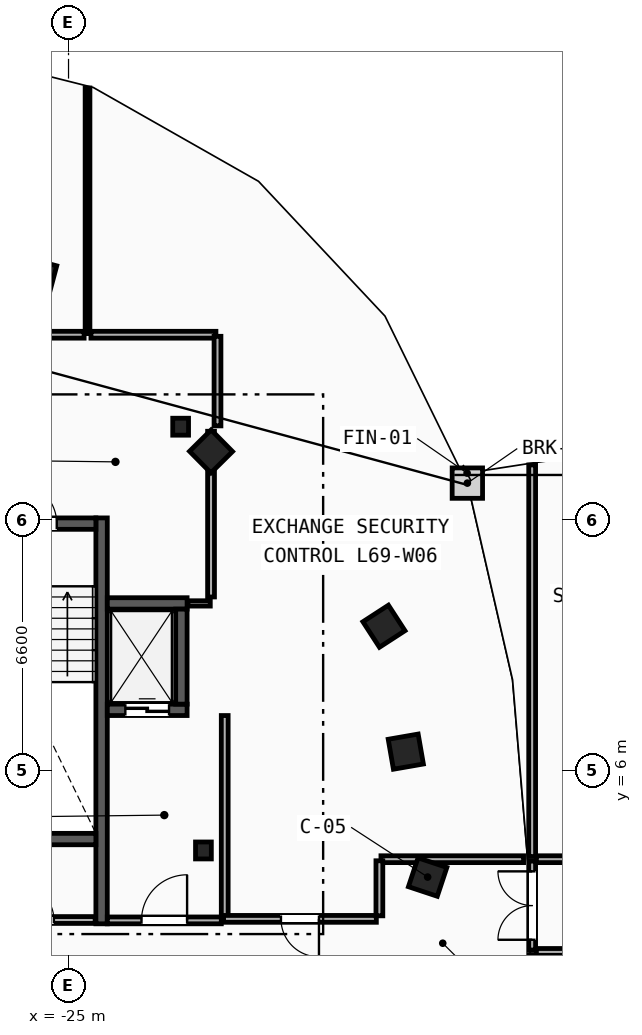
"""IFC4 building model, lengths in metres.
Left out: names, types, materials, properties, quantities, classifications, styles, units other than length and angle.
Written with IfcOpenShell. Run it as: python <this file> out.ifc"""

import sys

from ifc_helpers import new_model, si_unit, direction, frame, frame_2d, origin, origin_2d, place, context, subcontext, project, spatial, rectangle, i_section, extrude, element, fill, save


model = new_model("IFC4")
c1 = context("Model", 3, precision=1e-05, world=origin(), true_north=direction((0.0, 1.0)))
c2 = subcontext(c1, "Body", "Model", "MODEL_VIEW")
j1 = project(units=[si_unit("LENGTHUNIT", "METRE"), si_unit("PLANEANGLEUNIT", "RADIAN")], contexts=[c1])
p1 = place(None, origin())
s1 = spatial("IfcSite", under=j1, at=p1, CompositionType="ELEMENT")
p2 = place(p1, origin())
s2 = spatial("IfcBuilding", under=s1, at=p2, CompositionType="ELEMENT")
p3 = place(p2, frame((0.0, 0.0, 261.2)))
s3 = spatial("IfcBuildingStorey", under=s2, at=p3, CompositionType="ELEMENT", Elevation=261.2)
for number, where, z_axis, x_axis in (
    (1, (-21.45, 3.9, 0.0), (0.0, 0.0, 1.0), (1.0, 0.0, 0.0)),
    (2, (-22.05, 15.05, 0.0), (0.0, 0.0, 1.0), (1.0, 0.0, 0.0)),
):
    element("IfcColumn", number, at=place(p3, frame(where, z_axis=z_axis, x_axis=x_axis)), inside=s3, PredefinedType="COLUMN", context=c2, shape_type="SweptSolid", body=[
        extrude(i_section(OverallWidth=0.416, OverallDepth=0.446, WebThickness=0.039, FlangeThickness=0.063, FilletRadius=0.018, at=origin_2d()), origin(), (0.0, 0.0, 1.0), 3.6),
    ])
for number, where, z_axis, x_axis in (
    (3, (-15.55, 3.2, 0.0), (0.0, 0.0, 1.0), (0.315, 0.949, 0.0)),
    (4, (-16.125, 6.5, 0.0), (0.0, 0.0, 1.0), (-0.172, 0.985, 0.0)),
    (5, (-16.7, 9.8, 0.0), (0.0, 0.0, 1.0), (-0.544, 0.839, 0.0)),
    (6, (-21.25, 14.4, 0.0), (0.0, 0.0, 1.0), (-0.703, 0.711, 0.0)),
    (7, (-25.8, 19.0, 0.0), (0.0, 0.0, 1.0), (-0.966, 0.259, 0.0)),
):
    element("IfcColumn", number, at=place(p3, frame(where, z_axis=z_axis, x_axis=x_axis)), inside=s3, PredefinedType="COLUMN", context=c2, shape_type="SweptSolid", body=[
        extrude(rectangle(XDim=0.8, YDim=0.8, at=origin_2d()), origin(), (0.0, 0.0, 1.0), 3.6),
    ])
p4 = place(p3, frame((-24.13, 1.97, 0.0), z_axis=(0.0, 0.0, 1.0), x_axis=(0.0, 1.0, 0.0)))
e8 = element("IfcWall", 8, at=p4, inside=s3, PredefinedType="SHEAR", context=c2, shape_type="SweptSolid", body=[
    extrude(rectangle(XDim=10.68, YDim=0.3, at=frame_2d((5.34, 0.0))), origin(), (0.0, 0.0, 1.0), 3.34),
])
p5 = place(p3, frame((-27.44, 12.5, 0.0), z_axis=(0.0, 0.0, 1.0), x_axis=(1.0, 0.0, 0.0)))
e9 = element("IfcWall", 9, at=p5, inside=s3, PredefinedType="SHEAR", context=c2, shape_type="SweptSolid", body=[
    extrude(rectangle(XDim=3.16, YDim=0.3, at=frame_2d((1.58, 0.0))), origin(), (0.0, 0.0, 1.0), 3.34),
])
p6 = place(p5, frame((1.03, 0.0, 0.0)))
e10 = element("IfcOpeningElement", 10, at=p6, cuts=e9, PredefinedType="OPENING", context=c2, shape_type="SweptSolid", body=[
    extrude(rectangle(XDim=1.1, YDim=2.15, at=frame_2d((0.55, 1.075))), frame((0.0, 0.16, 0.0), z_axis=(0.0, -1.0, 0.0), x_axis=(1.0, 0.0, 0.0)), (0.0, 0.0, 1.0), 0.32),
])
p7 = place(p3, frame((-27.44, 4.2, 0.0), z_axis=(0.0, 0.0, 1.0), x_axis=(1.0, 0.0, 0.0)))
e11 = element("IfcWall", 11, at=p7, inside=s3, PredefinedType="SHEAR", context=c2, shape_type="SweptSolid", body=[
    extrude(rectangle(XDim=3.16, YDim=0.3, at=frame_2d((1.58, 0.0))), origin(), (0.0, 0.0, 1.0), 3.34),
])
p8 = place(p3, frame((-20.89, 2.15, 0.0), z_axis=(0.0, 0.0, 1.0), x_axis=(0.0, 1.0, 0.0)))
e12 = element("IfcWall", 12, at=p8, inside=s3, PredefinedType="PARTITIONING", context=c2, shape_type="SweptSolid", body=[
    extrude(rectangle(XDim=5.3, YDim=0.18, at=frame_2d((2.65, 0.0))), origin(), (0.0, 0.0, 1.0), 3.34),
])
p9 = place(p3, frame((-23.98, 2.06, 0.0), z_axis=(0.0, 0.0, 1.0), x_axis=(1.0, 0.0, 0.0)))
e13 = element("IfcWall", 13, at=p9, inside=s3, PredefinedType="PARTITIONING", context=c2, shape_type="SweptSolid", body=[
    extrude(rectangle(XDim=3.0, YDim=0.18, at=frame_2d((1.5, 0.0))), origin(), (0.0, 0.0, 1.0), 3.34),
])
p10 = place(p9, frame((0.9, 0.0, 0.0)))
e14 = element("IfcOpeningElement", 14, at=p10, cuts=e13, PredefinedType="OPENING", context=c2, shape_type="SweptSolid", body=[
    extrude(rectangle(XDim=1.2, YDim=2.15, at=frame_2d((0.6, 1.075))), frame((0.0, 0.1, 0.0), z_axis=(0.0, -1.0, 0.0), x_axis=(1.0, 0.0, 0.0)), (0.0, 0.0, 1.0), 0.2),
])
p11 = place(p3, frame((-23.98, 7.6, 0.0), z_axis=(0.0, 0.0, 1.0), x_axis=(1.0, 0.0, 0.0)))
e15 = element("IfcWall", 15, at=p11, inside=s3, PredefinedType="SHEAR", context=c2, shape_type="SweptSolid", body=[
    extrude(rectangle(XDim=2.1, YDim=0.3, at=frame_2d((1.05, 0.0))), origin(), (0.0, 0.0, 1.0), 3.34),
])
p12 = place(p11, frame((0.475, 0.0, 0.0)))
e16 = element("IfcOpeningElement", 16, at=p12, cuts=e15, PredefinedType="OPENING", context=c2, shape_type="SweptSolid", body=[
    extrude(rectangle(XDim=1.15, YDim=2.2, at=frame_2d((0.575, 1.1))), frame((0.0, 0.16, 0.0), z_axis=(0.0, -1.0, 0.0), x_axis=(1.0, 0.0, 0.0)), (0.0, 0.0, 1.0), 0.32),
])
p13 = place(p3, frame((-23.98, 10.4, 0.0), z_axis=(0.0, 0.0, 1.0), x_axis=(1.0, 0.0, 0.0)))
e17 = element("IfcWall", 17, at=p13, inside=s3, PredefinedType="SHEAR", context=c2, shape_type="SweptSolid", body=[
    extrude(rectangle(XDim=2.1, YDim=0.3, at=frame_2d((1.05, 0.0))), origin(), (0.0, 0.0, 1.0), 3.34),
])
p14 = place(p3, frame((-22.03, 7.75, 0.0), z_axis=(0.0, 0.0, 1.0), x_axis=(0.0, 1.0, 0.0)))
e18 = element("IfcWall", 18, at=p14, inside=s3, PredefinedType="SHEAR", context=c2, shape_type="SweptSolid", body=[
    extrude(rectangle(XDim=2.5, YDim=0.3, at=frame_2d((1.25, 0.0))), origin(), (0.0, 0.0, 1.0), 3.34),
])
p15 = place(p3, frame((-21.86, 10.4, 0.0), z_axis=(0.0, 0.0, 1.0), x_axis=(1.0, 0.0, 0.0)))
e19 = element("IfcWall", 19, at=p15, inside=s3, PredefinedType="PARTITIONING", context=c2, shape_type="SweptSolid", body=[
    extrude(rectangle(XDim=0.59, YDim=0.14, at=frame_2d((0.295, 0.0))), origin(), (0.0, 0.0, 1.0), 3.34),
])
p16 = place(p3, frame((-21.25, 10.57, 0.0), z_axis=(0.0, 0.0, 1.0), x_axis=(0.0, 1.0, 0.0)))
e20 = element("IfcWall", 20, at=p16, inside=s3, PredefinedType="PARTITIONING", context=c2, shape_type="SweptSolid", body=[
    extrude(rectangle(XDim=4.36, YDim=0.18, at=frame_2d((2.18, 0.0))), origin(), (0.0, 0.0, 1.0), 3.34),
])
p17 = place(p3, frame((-27.42, 2.07, 0.0), z_axis=(0.0, 0.0, 1.0), x_axis=(1.0, 0.0, 0.0)))
e21 = element("IfcWall", 21, at=p17, inside=s3, PredefinedType="PARTITIONING", context=c2, shape_type="SweptSolid", body=[
    extrude(rectangle(XDim=3.12, YDim=0.18, at=frame_2d((1.56, 0.0))), origin(), (0.0, 0.0, 1.0), 3.34),
])
p18 = place(p17, frame((1.085, 0.0, 0.0)))
e22 = element("IfcOpeningElement", 22, at=p18, cuts=e21, PredefinedType="OPENING", context=c2, shape_type="SweptSolid", body=[
    extrude(rectangle(XDim=0.95, YDim=2.1, at=frame_2d((0.475, 1.05))), frame((0.0, 0.1, 0.0), z_axis=(0.0, -1.0, 0.0), x_axis=(1.0, 0.0, 0.0)), (0.0, 0.0, 1.0), 0.2),
])
p19 = place(p3, frame((-24.5, 17.5, 0.0), z_axis=(0.0, 0.0, 1.0), x_axis=(0.0, 1.0, 0.0)))
e23 = element("IfcWall", 23, at=p19, inside=s3, PredefinedType="PARTITIONING", context=c2, shape_type="SweptSolid", body=[
    extrude(rectangle(XDim=6.463, YDim=0.125, at=frame_2d((3.231, 0.0))), origin(), (0.0, 0.0, 1.0), 3.34),
])
p20 = place(p3, frame((-16.9, 2.1, 0.0), z_axis=(0.0, 0.0, 1.0), x_axis=(-1.0, 0.0, 0.0)))
e24 = element("IfcWall", 24, at=p20, inside=s3, PredefinedType="PARTITIONING", context=c2, shape_type="SweptSolid", body=[
    extrude(rectangle(XDim=4.02, YDim=0.18, at=frame_2d((2.01, 0.0))), origin(), (0.0, 0.0, 1.0), 3.34),
])
p21 = place(p20, frame((1.51, 0.0, 0.0)))
e25 = element("IfcOpeningElement", 25, at=p21, cuts=e24, PredefinedType="OPENING", context=c2, shape_type="SweptSolid", body=[
    extrude(rectangle(XDim=1.0, YDim=2.15, at=frame_2d((0.5, 1.075))), frame((0.0, 0.1, 0.0), z_axis=(0.0, -1.0, 0.0), x_axis=(1.0, 0.0, 0.0)), (0.0, 0.0, 1.0), 0.2),
])
p22 = place(p3, frame((-13.026, 3.67, 0.0), z_axis=(0.0, 0.0, 1.0), x_axis=(-1.0, 0.0, 0.0)))
e26 = element("IfcWall", 26, at=p22, inside=s3, PredefinedType="PARTITIONING", context=c2, shape_type="SweptSolid", body=[
    extrude(rectangle(XDim=3.753, YDim=0.18, at=frame_2d((1.876, 0.0))), origin(), (0.0, 0.0, 1.0), 3.34),
])
p23 = place(p3, frame((-21.122, 17.47, 0.0), z_axis=(0.0, 0.0, 1.0), x_axis=(-1.0, 0.0, 0.0)))
e27 = element("IfcWall", 27, at=p23, inside=s3, PredefinedType="PARTITIONING", context=c2, shape_type="SweptSolid", body=[
    extrude(rectangle(XDim=3.288, YDim=0.18, at=frame_2d((1.644, 0.0))), origin(), (0.0, 0.0, 1.0), 3.34),
])
p24 = place(p3, frame((-21.08, 15.072, 0.0), z_axis=(0.0, 0.0, 1.0), x_axis=(0.0, 1.0, 0.0)))
e28 = element("IfcWall", 28, at=p24, inside=s3, PredefinedType="PARTITIONING", context=c2, shape_type="SweptSolid", body=[
    extrude(rectangle(XDim=2.357, YDim=0.18, at=frame_2d((1.178, 0.0))), origin(), (0.0, 0.0, 1.0), 3.34),
])
p25 = place(p3, frame((-16.82, 3.628, 0.0), z_axis=(0.0, 0.0, 1.0), x_axis=(0.0, -1.0, 0.0)))
e29 = element("IfcWall", 29, at=p25, inside=s3, PredefinedType="PARTITIONING", context=c2, shape_type="SweptSolid", body=[
    extrude(rectangle(XDim=1.448, YDim=0.18, at=frame_2d((0.724, 0.0))), origin(), (0.0, 0.0, 1.0), 3.34),
])
p26 = place(p3, frame((-24.59, 17.47, 0.0), z_axis=(0.0, 0.0, 1.0), x_axis=(-1.0, 0.0, 0.0)))
e30 = element("IfcWall", 30, at=p26, inside=s3, PredefinedType="PARTITIONING", context=c2, shape_type="SweptSolid", body=[
    extrude(rectangle(XDim=6.82, YDim=0.18, at=frame_2d((3.41, 0.0))), origin(), (0.0, 0.0, 1.0), 3.34),
])
p27 = place(p26, frame((2.91, 0.0, 0.0)))
e31 = element("IfcOpeningElement", 31, at=p27, cuts=e30, PredefinedType="OPENING", context=c2, shape_type="SweptSolid", body=[
    extrude(rectangle(XDim=1.0, YDim=2.15, at=frame_2d((0.5, 1.075))), frame((0.0, 0.1, 0.0), z_axis=(0.0, -1.0, 0.0), x_axis=(1.0, 0.0, 0.0)), (0.0, 0.0, 1.0), 0.2),
])
p28 = place(p3, frame((-12.688, 1.23, 0.0), z_axis=(0.0, 0.0, 1.0), x_axis=(1.0, 0.0, 0.0)))
e32 = element("IfcWall", 32, at=p28, inside=s3, PredefinedType="PARTITIONING", context=c2, shape_type="SweptSolid", body=[
    extrude(rectangle(XDim=10.394, YDim=0.18, at=frame_2d((5.197, 0.0))), origin(), (0.0, 0.0, 1.0), 2.663),
])
p29 = place(p28, frame((5.68, 0.0, 0.0)))
e33 = element("IfcOpeningElement", 33, at=p29, cuts=e32, PredefinedType="OPENING", context=c2, shape_type="SweptSolid", body=[
    extrude(rectangle(XDim=1.6, YDim=2.2, at=frame_2d((0.8, 1.1))), frame((0.0, 0.1, 0.0), z_axis=(0.0, -1.0, 0.0), x_axis=(1.0, 0.0, 0.0)), (0.0, 0.0, 1.0), 0.2),
])
p30 = place(p3, frame((-2.295, 3.67, 0.0), z_axis=(0.0, 0.0, 1.0), x_axis=(-1.0, 0.0, 0.0)))
e34 = element("IfcWall", 34, at=p30, inside=s3, PredefinedType="PARTITIONING", context=c2, shape_type="SweptSolid", body=[
    extrude(rectangle(XDim=10.394, YDim=0.18, at=frame_2d((5.197, 0.0))), origin(), (0.0, 0.0, 1.0), 3.34),
])
p31 = place(p30, frame((3.114, 0.0, 0.0)))
e35 = element("IfcOpeningElement", 35, at=p31, cuts=e34, PredefinedType="OPENING", context=c2, shape_type="SweptSolid", body=[
    extrude(rectangle(XDim=1.6, YDim=2.2, at=frame_2d((0.8, 1.1))), frame((0.0, 0.1, 0.0), z_axis=(0.0, -1.0, 0.0), x_axis=(1.0, 0.0, 0.0)), (0.0, 0.0, 1.0), 0.2),
])
p32 = place(p3, frame((-12.8, -0.285, 0.0), z_axis=(0.0, 0.0, 1.0), x_axis=(0.0, 1.0, 0.0)))
e36 = element("IfcWall", 36, at=p32, inside=s3, PredefinedType="PARTITIONING", context=c2, shape_type="SweptSolid", body=[
    extrude(rectangle(XDim=1.445, YDim=0.18, at=frame_2d((0.722, 0.0))), origin(), (0.0, 0.0, 1.0), 3.34),
])
p33 = place(p3, frame((-12.8, 3.74, 0.0), z_axis=(0.0, 0.0, 1.0), x_axis=(0.0, 1.0, 0.0)))
e37 = element("IfcWall", 37, at=p33, inside=s3, PredefinedType="PARTITIONING", context=c2, shape_type="SweptSolid", body=[
    extrude(rectangle(XDim=10.304, YDim=0.18, at=frame_2d((5.152, 0.0))), origin(), (0.0, 0.0, 1.0), 3.34),
])
p34 = place(p3, frame((-12.8, 1.28, 0.0), z_axis=(0.0, 0.0, 1.0), x_axis=(0.0, 1.0, 0.0)))
e38 = element("IfcWall", 38, at=p34, inside=s3, PredefinedType="PARTITIONING", context=c2, shape_type="SweptSolid", body=[
    extrude(rectangle(XDim=2.34, YDim=0.18, at=frame_2d((1.17, 0.0))), origin(), (0.0, 0.0, 1.0), 3.34),
])
p35 = place(p34, frame((0.27, 0.0, 0.0)))
e39 = element("IfcOpeningElement", 39, at=p35, cuts=e38, PredefinedType="OPENING", context=c2, shape_type="SweptSolid", body=[
    extrude(rectangle(XDim=1.8, YDim=2.25, at=frame_2d((0.9, 1.125))), frame((0.0, 0.1, 0.0), z_axis=(0.0, -1.0, 0.0), x_axis=(1.0, 0.0, 0.0)), (0.0, 0.0, 1.0), 0.2),
])
p36 = place(p6, origin())
e40 = element("IfcDoor", 40, at=p36, inside=s3, OperationType="SINGLE_SWING_LEFT", PredefinedType="DOOR", context=c2, shape_type="SweptSolid", body=[
    extrude(rectangle(XDim=1.1, YDim=2.15, at=frame_2d((0.55, 1.075))), frame((0.0, 0.025, 0.0), z_axis=(0.0, -1.0, 0.0), x_axis=(1.0, 0.0, 0.0)), (0.0, 0.0, 1.0), 0.05),
])
fill(e10, e40)
p37 = place(p10, origin())
e41 = element("IfcDoor", 41, at=p37, inside=s3, OperationType="SINGLE_SWING_RIGHT", PredefinedType="DOOR", context=c2, shape_type="SweptSolid", body=[
    extrude(rectangle(XDim=1.2, YDim=2.15, at=frame_2d((0.6, 1.075))), frame((0.0, 0.025, 0.0), z_axis=(0.0, -1.0, 0.0), x_axis=(1.0, 0.0, 0.0)), (0.0, 0.0, 1.0), 0.05),
])
fill(e14, e41)
p38 = place(p12, origin())
e42 = element("IfcDoor", 42, at=p38, inside=s3, OperationType="SLIDING_TO_LEFT", PredefinedType="TRAPDOOR", context=c2, shape_type="SweptSolid", body=[
    extrude(rectangle(XDim=1.15, YDim=2.2, at=frame_2d((0.575, 1.1))), frame((0.0, 0.025, 0.0), z_axis=(0.0, -1.0, 0.0), x_axis=(1.0, 0.0, 0.0)), (0.0, 0.0, 1.0), 0.05),
])
fill(e16, e42)
p39 = place(p21, origin())
e43 = element("IfcDoor", 43, at=p39, inside=s3, OperationType="SINGLE_SWING_LEFT", PredefinedType="DOOR", context=c2, shape_type="SweptSolid", body=[
    extrude(rectangle(XDim=1.0, YDim=2.15, at=frame_2d((0.5, 1.075))), frame((0.0, 0.025, 0.0), z_axis=(0.0, -1.0, 0.0), x_axis=(1.0, 0.0, 0.0)), (0.0, 0.0, 1.0), 0.05),
])
fill(e25, e43)
p40 = place(p18, origin())
e44 = element("IfcDoor", 44, at=p40, inside=s3, OperationType="SINGLE_SWING_LEFT", PredefinedType="DOOR", context=c2, shape_type="SweptSolid", body=[
    extrude(rectangle(XDim=0.95, YDim=2.1, at=frame_2d((0.475, 1.05))), frame((0.0, 0.025, 0.0), z_axis=(0.0, -1.0, 0.0), x_axis=(1.0, 0.0, 0.0)), (0.0, 0.0, 1.0), 0.05),
])
fill(e22, e44)
p41 = place(p35, origin())
e45 = element("IfcDoor", 45, at=p41, inside=s3, OperationType="DOUBLE_DOOR_SINGLE_SWING", PredefinedType="DOOR", context=c2, shape_type="SweptSolid", body=[
    extrude(rectangle(XDim=1.8, YDim=2.25, at=frame_2d((0.9, 1.125))), frame((0.0, 0.025, 0.0), z_axis=(0.0, -1.0, 0.0), x_axis=(1.0, 0.0, 0.0)), (0.0, 0.0, 1.0), 0.05),
])
fill(e39, e45)
save(model, sys.argv[1])
